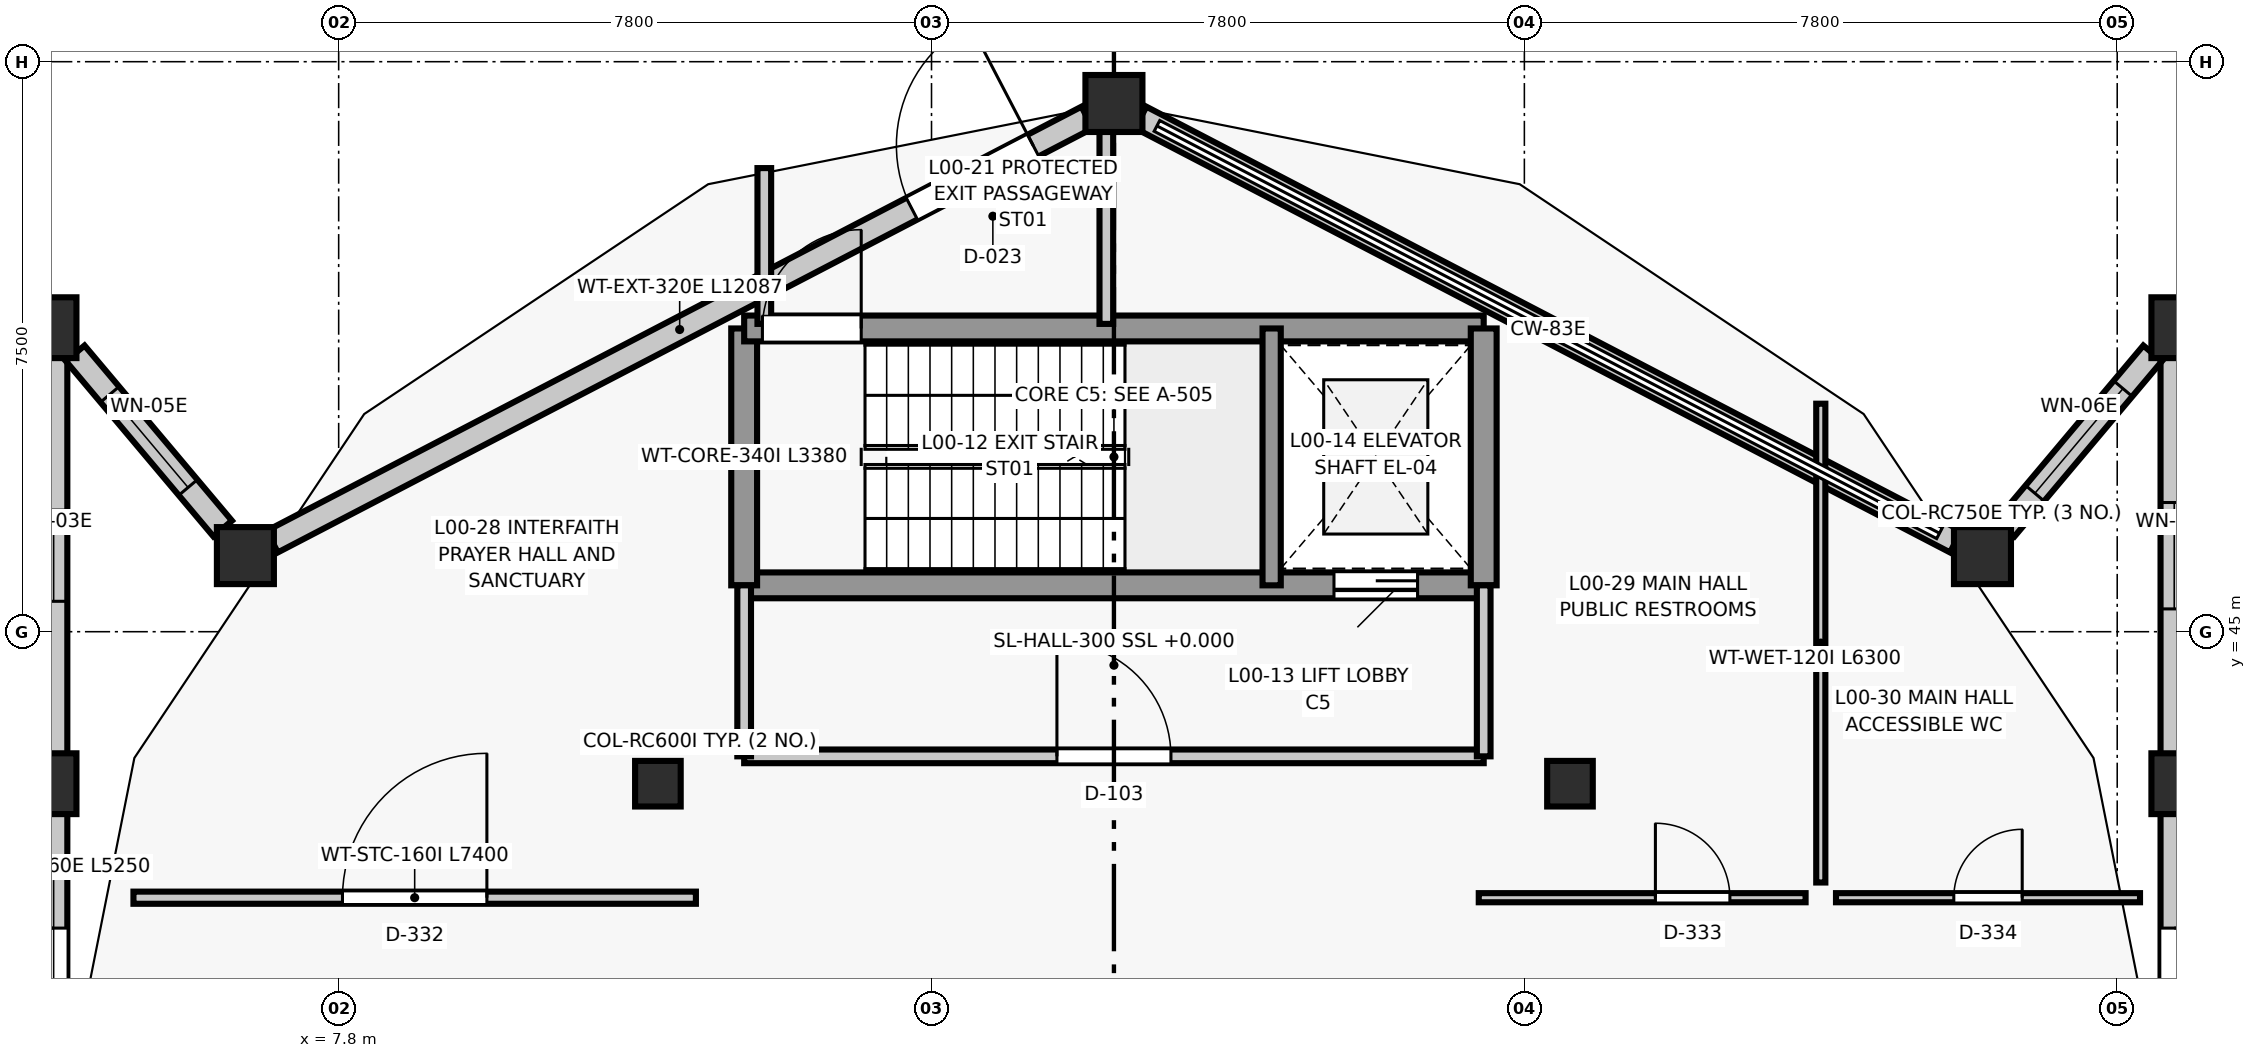
"""IFC4 building model, lengths in metres.
Left out: names, types, materials, properties, quantities, classifications, styles, units other than length and angle.
Written with IfcOpenShell. Run it as: python <this file> out.ifc"""

import sys

from ifc_helpers import new_model, si_unit, direction, frame, frame_2d, origin, origin_2d, place, context, subcontext, project, spatial, rectangle, extrude, element, fill, save


model = new_model("IFC4")
c1 = context("Model", 3, precision=1e-05, world=origin(), true_north=direction((0.0, 1.0)))
c2 = subcontext(c1, "Body", "Model", "MODEL_VIEW")
j1 = project(units=[si_unit("LENGTHUNIT", "METRE"), si_unit("PLANEANGLEUNIT", "RADIAN")], contexts=[c1])
p1 = place(None, origin())
s1 = spatial("IfcSite", under=j1, at=p1, CompositionType="ELEMENT")
p2 = place(p1, origin())
s2 = spatial("IfcBuilding", under=s1, at=p2, CompositionType="ELEMENT")
p3 = place(p2, origin())
s3 = spatial("IfcBuildingStorey", under=s2, at=p3, CompositionType="ELEMENT", Elevation=0.0)
for number, where, z_axis, x_axis in (
    (1, (29.427, 46.001, 0.0), (0.0, 0.0, 1.0), (1.0, 0.0, 0.0)),
    (2, (18.0, 51.95, 0.0), (0.0, 0.0, 1.0), (1.0, 0.0, 0.0)),
    (3, (6.573, 46.001, 0.0), (0.0, 0.0, 1.0), (1.0, 0.0, 0.0)),
):
    element("IfcColumn", number, at=place(p3, frame(where, z_axis=z_axis, x_axis=x_axis)), inside=s3, PredefinedType="COLUMN", context=c2, shape_type="SweptSolid", body=[
        extrude(rectangle(XDim=0.75, YDim=0.75, at=origin_2d()), origin(), (0.0, 0.0, 1.0), 4.5),
    ])
for number, where, z_axis, x_axis in (
    (4, (12.0, 43.0, 0.0), (0.0, 0.0, 1.0), (1.0, 0.0, 0.0)),
    (5, (24.0, 43.0, 0.0), (0.0, 0.0, 1.0), (1.0, 0.0, 0.0)),
):
    element("IfcColumn", number, at=place(p3, frame(where, z_axis=z_axis, x_axis=x_axis)), inside=s3, PredefinedType="COLUMN", context=c2, shape_type="SweptSolid", body=[
        extrude(rectangle(XDim=0.6, YDim=0.6, at=origin_2d()), origin(), (0.0, 0.0, 1.0), 4.5),
    ])
for number, where, z_axis, x_axis in (
    (6, (31.95, 43.0, 0.0), (0.0, 0.0, 1.0), (1.0, 0.0, 0.0)),
    (7, (31.95, 49.0, 0.0), (0.0, 0.0, 1.0), (1.0, 0.0, 0.0)),
    (8, (4.05, 43.0, 0.0), (0.0, 0.0, 1.0), (1.0, 0.0, 0.0)),
    (9, (4.05, 49.0, 0.0), (0.0, 0.0, 1.0), (1.0, 0.0, 0.0)),
):
    element("IfcColumn", number, at=place(p3, frame(where, z_axis=z_axis, x_axis=x_axis)), inside=s3, PredefinedType="COLUMN", context=c2, shape_type="SweptSolid", body=[
        extrude(rectangle(XDim=0.6, YDim=0.8, at=origin_2d()), origin(), (0.0, 0.0, 1.0), 4.5),
    ])
p4 = place(p3, frame((4.05, 37.375, 0.0), z_axis=(0.0, 0.0, 1.0), x_axis=(0.0, 1.0, 0.0)))
e10 = element("IfcWall", 10, at=p4, inside=s3, PredefinedType="STANDARD", context=c2, shape_type="SweptSolid", body=[
    extrude(rectangle(XDim=5.25, YDim=0.36, at=frame_2d((2.625, 0.0))), origin(), (0.0, 0.0, 1.0), 3.345),
])
p5 = place(p4, frame((1.525, 0.0, 0.0)))
e11 = element("IfcOpeningElement", 11, at=p5, cuts=e10, PredefinedType="OPENING", context=c2, shape_type="SweptSolid", body=[
    extrude(rectangle(XDim=2.2, YDim=2.35, at=frame_2d((1.1, 1.175))), frame((0.0, 0.19, 0.0), z_axis=(0.0, -1.0, 0.0), x_axis=(1.0, 0.0, 0.0)), (0.0, 0.0, 1.0), 0.38),
])
p6 = place(p3, frame((31.95, 42.625, 0.0), z_axis=(0.0, 0.0, 1.0), x_axis=(0.0, -1.0, 0.0)))
e12 = element("IfcWall", 12, at=p6, inside=s3, PredefinedType="STANDARD", context=c2, shape_type="SweptSolid", body=[
    extrude(rectangle(XDim=5.25, YDim=0.36, at=frame_2d((2.625, 0.0))), origin(), (0.0, 0.0, 1.0), 3.345),
])
p7 = place(p6, frame((1.525, 0.0, 0.0)))
e13 = element("IfcOpeningElement", 13, at=p7, cuts=e12, PredefinedType="OPENING", context=c2, shape_type="SweptSolid", body=[
    extrude(rectangle(XDim=2.2, YDim=2.35, at=frame_2d((1.1, 1.175))), frame((0.0, 0.19, 0.0), z_axis=(0.0, -1.0, 0.0), x_axis=(1.0, 0.0, 0.0)), (0.0, 0.0, 1.0), 0.38),
])
p8 = place(p3, frame((4.05, 43.375, 0.0), z_axis=(0.0, 0.0, 1.0), x_axis=(0.0, 1.0, 0.0)))
e14 = element("IfcWall", 14, at=p8, inside=s3, PredefinedType="STANDARD", context=c2, shape_type="SweptSolid", body=[
    extrude(rectangle(XDim=5.25, YDim=0.36, at=frame_2d((2.625, 0.0))), origin(), (0.0, 0.0, 1.0), 3.345),
])
p9 = place(p8, frame((2.025, 0.0, 0.9)))
e15 = element("IfcOpeningElement", 15, at=p9, cuts=e14, PredefinedType="OPENING", context=c2, shape_type="SweptSolid", body=[
    extrude(rectangle(XDim=1.2, YDim=1.2, at=frame_2d((0.6, 0.6))), frame((0.0, 0.19, 0.0), z_axis=(0.0, -1.0, 0.0), x_axis=(1.0, 0.0, 0.0)), (0.0, 0.0, 1.0), 0.38),
])
p10 = place(p3, frame((31.95, 48.625, 0.0), z_axis=(0.0, 0.0, 1.0), x_axis=(0.0, -1.0, 0.0)))
e16 = element("IfcWall", 16, at=p10, inside=s3, PredefinedType="STANDARD", context=c2, shape_type="SweptSolid", body=[
    extrude(rectangle(XDim=5.25, YDim=0.36, at=frame_2d((2.625, 0.0))), origin(), (0.0, 0.0, 1.0), 3.345),
])
p11 = place(p10, frame((1.925, 0.0, 0.9)))
e17 = element("IfcOpeningElement", 17, at=p11, cuts=e16, PredefinedType="OPENING", context=c2, shape_type="SweptSolid", body=[
    extrude(rectangle(XDim=1.4, YDim=1.4, at=frame_2d((0.7, 0.7))), frame((0.0, 0.19, 0.0), z_axis=(0.0, -1.0, 0.0), x_axis=(1.0, 0.0, 0.0)), (0.0, 0.0, 1.0), 0.38),
])
p12 = place(p3, frame((4.334, 48.663, 0.0), z_axis=(0.0, 0.0, 1.0), x_axis=(0.643796278673, -0.765196936459, 0.0)))
e18 = element("IfcWall", 18, at=p12, inside=s3, PredefinedType="STANDARD", context=c2, shape_type="SweptSolid", body=[
    extrude(rectangle(XDim=3.012, YDim=0.32, at=frame_2d((1.506, 0.0))), origin(), (0.0, 0.0, 1.0), 3.71),
])
p13 = place(p12, frame((0.706, 0.0, 0.85)))
e19 = element("IfcOpeningElement", 19, at=p13, cuts=e18, PredefinedType="OPENING", context=c2, shape_type="SweptSolid", body=[
    extrude(rectangle(XDim=1.6, YDim=1.4, at=frame_2d((0.8, 0.7))), frame((0.0, 0.17, 0.0), z_axis=(0.0, -1.0, 0.0), x_axis=(1.0, 0.0, 0.0)), (0.0, 0.0, 1.0), 0.34),
])
p14 = place(p3, frame((6.926, 46.185, 0.0), z_axis=(0.0, 0.0, 1.0), x_axis=(0.887012674584, 0.46174507591, 0.0)))
e20 = element("IfcWall", 20, at=p14, inside=s3, PredefinedType="STANDARD", context=c2, shape_type="SweptSolid", body=[
    extrude(rectangle(XDim=12.087, YDim=0.32, at=frame_2d((6.044, 0.0))), origin(), (0.0, 0.0, 1.0), 3.71),
])
p15 = place(p14, frame((9.487, 0.0, 0.0)))
e21 = element("IfcOpeningElement", 21, at=p15, cuts=e20, PredefinedType="OPENING", context=c2, shape_type="SweptSolid", body=[
    extrude(rectangle(XDim=1.8, YDim=2.25, at=frame_2d((0.9, 1.125))), frame((0.0, 0.17, 0.0), z_axis=(0.0, -1.0, 0.0), x_axis=(1.0, 0.0, 0.0)), (0.0, 0.0, 1.0), 0.34),
])
p16 = place(p3, frame((18.353, 51.766, 0.0), z_axis=(0.0, 0.0, 1.0), x_axis=(0.887012674584, -0.46174507591, 0.0)))
e22 = element("IfcWall", 22, at=p16, inside=s3, PredefinedType="STANDARD", context=c2, shape_type="SweptSolid", body=[
    extrude(rectangle(XDim=12.087, YDim=0.32, at=frame_2d((6.044, 0.0))), origin(), (0.0, 0.0, 1.0), 0.8),
])
p17 = place(p3, frame((29.727, 46.357, 0.0), z_axis=(0.0, 0.0, 1.0), x_axis=(0.643796278673, 0.765196936459, 0.0)))
e23 = element("IfcWall", 23, at=p17, inside=s3, PredefinedType="STANDARD", context=c2, shape_type="SweptSolid", body=[
    extrude(rectangle(XDim=3.012, YDim=0.32, at=frame_2d((1.506, 0.0))), origin(), (0.0, 0.0, 1.0), 3.71),
])
p18 = place(p17, frame((0.606, 0.0, 0.85)))
e24 = element("IfcOpeningElement", 24, at=p18, cuts=e23, PredefinedType="OPENING", context=c2, shape_type="SweptSolid", body=[
    extrude(rectangle(XDim=1.8, YDim=1.4, at=frame_2d((0.9, 0.7))), frame((0.0, 0.17, 0.0), z_axis=(0.0, -1.0, 0.0), x_axis=(1.0, 0.0, 0.0)), (0.0, 0.0, 1.0), 0.34),
])
p19 = place(p3, frame((22.865, 45.61, 0.0), z_axis=(0.0, 0.0, 1.0), x_axis=(-1.0, 0.0, 0.0)))
e25 = element("IfcWall", 25, at=p19, inside=s3, PredefinedType="SHEAR", context=c2, shape_type="SweptSolid", body=[
    extrude(rectangle(XDim=9.73, YDim=0.34, at=frame_2d((4.865, 0.0))), origin(), (0.0, 0.0, 1.0), 4.5),
])
p20 = place(p19, frame((0.87, 0.0, 0.0)))
e26 = element("IfcOpeningElement", 26, at=p20, cuts=e25, PredefinedType="OPENING", context=c2, shape_type="SweptSolid", body=[
    extrude(rectangle(XDim=1.1, YDim=2.15, at=frame_2d((0.55, 1.075))), frame((0.0, 0.18, 0.0), z_axis=(0.0, -1.0, 0.0), x_axis=(1.0, 0.0, 0.0)), (0.0, 0.0, 1.0), 0.36),
])
p21 = place(p3, frame((13.135, 45.61, 0.0), z_axis=(0.0, 0.0, 1.0), x_axis=(0.0, 1.0, 0.0)))
e27 = element("IfcWall", 27, at=p21, inside=s3, PredefinedType="SHEAR", context=c2, shape_type="SweptSolid", body=[
    extrude(rectangle(XDim=3.38, YDim=0.34, at=frame_2d((1.69, 0.0))), origin(), (0.0, 0.0, 1.0), 4.5),
])
p22 = place(p3, frame((13.135, 48.99, 0.0), z_axis=(0.0, 0.0, 1.0), x_axis=(1.0, 0.0, 0.0)))
e28 = element("IfcWall", 28, at=p22, inside=s3, PredefinedType="SHEAR", context=c2, shape_type="SweptSolid", body=[
    extrude(rectangle(XDim=9.73, YDim=0.34, at=frame_2d((4.865, 0.0))), origin(), (0.0, 0.0, 1.0), 4.5),
])
p23 = place(p22, frame((0.24, 0.0, 0.0)))
e29 = element("IfcOpeningElement", 29, at=p23, cuts=e28, PredefinedType="OPENING", context=c2, shape_type="SweptSolid", body=[
    extrude(rectangle(XDim=1.3, YDim=2.15, at=frame_2d((0.65, 1.075))), frame((0.0, 0.18, 0.0), z_axis=(0.0, -1.0, 0.0), x_axis=(1.0, 0.0, 0.0)), (0.0, 0.0, 1.0), 0.36),
])
p24 = place(p3, frame((22.865, 48.99, 0.0), z_axis=(0.0, 0.0, 1.0), x_axis=(0.0, -1.0, 0.0)))
e30 = element("IfcWall", 30, at=p24, inside=s3, PredefinedType="SHEAR", context=c2, shape_type="SweptSolid", body=[
    extrude(rectangle(XDim=3.38, YDim=0.34, at=frame_2d((1.69, 0.0))), origin(), (0.0, 0.0, 1.0), 4.5),
])
p25 = place(p3, frame((20.075, 45.61, 0.0), z_axis=(0.0, 0.0, 1.0), x_axis=(0.0, 1.0, 0.0)))
e31 = element("IfcWall", 31, at=p25, inside=s3, PredefinedType="SHEAR", context=c2, shape_type="SweptSolid", body=[
    extrude(rectangle(XDim=3.38, YDim=0.24, at=frame_2d((1.69, 0.0))), origin(), (0.0, 0.0, 1.0), 4.5),
])
p26 = place(p3, frame((13.135, 43.36, 0.0), z_axis=(0.0, 0.0, 1.0), x_axis=(1.0, 0.0, 0.0)))
e32 = element("IfcWall", 32, at=p26, inside=s3, PredefinedType="PARTITIONING", context=c2, shape_type="SweptSolid", body=[
    extrude(rectangle(XDim=9.73, YDim=0.18, at=frame_2d((4.865, 0.0))), origin(), (0.0, 0.0, 1.0), 4.255),
])
p27 = place(p26, frame((4.115, 0.0, 0.0)))
e33 = element("IfcOpeningElement", 33, at=p27, cuts=e32, PredefinedType="OPENING", context=c2, shape_type="SweptSolid", body=[
    extrude(rectangle(XDim=1.5, YDim=2.15, at=frame_2d((0.75, 1.075))), frame((0.0, 0.1, 0.0), z_axis=(0.0, -1.0, 0.0), x_axis=(1.0, 0.0, 0.0)), (0.0, 0.0, 1.0), 0.2),
])
for number, where, z_axis, x_axis in (
    (34, (13.135, 45.61, 0.0), (0.0, 0.0, 1.0), (0.0, -1.0, 0.0)),
    (35, (22.865, 45.61, 0.0), (0.0, 0.0, 1.0), (0.0, -1.0, 0.0)),
):
    element("IfcWall", number, at=place(p3, frame(where, z_axis=z_axis, x_axis=x_axis)), inside=s3, PredefinedType="PARTITIONING", context=c2, shape_type="SweptSolid", body=[
        extrude(rectangle(XDim=2.25, YDim=0.18, at=frame_2d((1.125, 0.0))), origin(), (0.0, 0.0, 1.0), 4.255),
    ])
p28 = place(p3, frame((13.4, 49.05, 0.0), z_axis=(0.0, 0.0, 1.0), x_axis=(0.0, 1.0, 0.0)))
e36 = element("IfcWall", 36, at=p28, inside=s3, PredefinedType="PARTITIONING", context=c2, shape_type="SweptSolid", body=[
    extrude(rectangle(XDim=2.05, YDim=0.18, at=frame_2d((1.025, 0.0))), origin(), (0.0, 0.0, 1.0), 4.255),
])
p29 = place(p3, frame((17.9, 49.05, 0.0), z_axis=(0.0, 0.0, 1.0), x_axis=(0.0, 1.0, 0.0)))
e37 = element("IfcWall", 37, at=p29, inside=s3, PredefinedType="PARTITIONING", context=c2, shape_type="SweptSolid", body=[
    extrude(rectangle(XDim=2.6, YDim=0.18, at=frame_2d((1.3, 0.0))), origin(), (0.0, 0.0, 1.0), 4.255),
])
p30 = place(p3, frame((5.1, 41.5, 0.0), z_axis=(0.0, 0.0, 1.0), x_axis=(1.0, 0.0, 0.0)))
e38 = element("IfcWall", 38, at=p30, inside=s3, PredefinedType="PARTITIONING", context=c2, shape_type="SweptSolid", body=[
    extrude(rectangle(XDim=7.4, YDim=0.16, at=frame_2d((3.7, 0.0))), origin(), (0.0, 0.0, 1.0), 4.255),
])
p31 = place(p30, frame((2.75, 0.0, 0.0)))
e39 = element("IfcOpeningElement", 39, at=p31, cuts=e38, PredefinedType="OPENING", context=c2, shape_type="SweptSolid", body=[
    extrude(rectangle(XDim=1.9, YDim=2.25, at=frame_2d((0.95, 1.125))), frame((0.0, 0.09, 0.0), z_axis=(0.0, -1.0, 0.0), x_axis=(1.0, 0.0, 0.0)), (0.0, 0.0, 1.0), 0.18),
])
p32 = place(p3, frame((22.8, 41.5, 0.0), z_axis=(0.0, 0.0, 1.0), x_axis=(1.0, 0.0, 0.0)))
e40 = element("IfcWall", 40, at=p32, inside=s3, PredefinedType="PARTITIONING", context=c2, shape_type="SweptSolid", body=[
    extrude(rectangle(XDim=4.3, YDim=0.12, at=frame_2d((2.15, 0.0))), origin(), (0.0, 0.0, 1.0), 4.255),
])
p33 = place(p32, frame((2.324, 0.0, 0.0)))
e41 = element("IfcOpeningElement", 41, at=p33, cuts=e40, PredefinedType="OPENING", context=c2, shape_type="SweptSolid", body=[
    extrude(rectangle(XDim=0.98, YDim=2.1, at=frame_2d((0.49, 1.05))), frame((0.0, 0.07, 0.0), z_axis=(0.0, -1.0, 0.0), x_axis=(1.0, 0.0, 0.0)), (0.0, 0.0, 1.0), 0.14),
])
p34 = place(p3, frame((27.5, 41.5, 0.0), z_axis=(0.0, 0.0, 1.0), x_axis=(1.0, 0.0, 0.0)))
e42 = element("IfcWall", 42, at=p34, inside=s3, PredefinedType="PARTITIONING", context=c2, shape_type="SweptSolid", body=[
    extrude(rectangle(XDim=4.0, YDim=0.12, at=frame_2d((2.0, 0.0))), origin(), (0.0, 0.0, 1.0), 4.255),
])
p35 = place(p34, frame((1.55, 0.0, 0.0)))
e43 = element("IfcOpeningElement", 43, at=p35, cuts=e42, PredefinedType="OPENING", context=c2, shape_type="SweptSolid", body=[
    extrude(rectangle(XDim=0.9, YDim=2.1, at=frame_2d((0.45, 1.05))), frame((0.0, 0.07, 0.0), z_axis=(0.0, -1.0, 0.0), x_axis=(1.0, 0.0, 0.0)), (0.0, 0.0, 1.0), 0.14),
])
p36 = place(p3, frame((27.3, 41.7, 0.0), z_axis=(0.0, 0.0, 1.0), x_axis=(0.0, 1.0, 0.0)))
e44 = element("IfcWall", 44, at=p36, inside=s3, PredefinedType="PARTITIONING", context=c2, shape_type="SweptSolid", body=[
    extrude(rectangle(XDim=6.3, YDim=0.12, at=frame_2d((3.15, 0.0))), origin(), (0.0, 0.0, 1.0), 4.255),
])
p37 = place(p5, origin())
e45 = element("IfcDoor", 45, at=p37, inside=s3, OperationType="SINGLE_SWING_RIGHT", PredefinedType="DOOR", context=c2, shape_type="SweptSolid", body=[
    extrude(rectangle(XDim=2.2, YDim=2.35, at=frame_2d((1.1, 1.175))), frame((0.0, 0.025, 0.0), z_axis=(0.0, -1.0, 0.0), x_axis=(1.0, 0.0, 0.0)), (0.0, 0.0, 1.0), 0.05),
])
fill(e11, e45)
p38 = place(p7, origin())
e46 = element("IfcDoor", 46, at=p38, inside=s3, OperationType="SINGLE_SWING_LEFT", PredefinedType="DOOR", context=c2, shape_type="SweptSolid", body=[
    extrude(rectangle(XDim=2.2, YDim=2.35, at=frame_2d((1.1, 1.175))), frame((0.0, 0.025, 0.0), z_axis=(0.0, -1.0, 0.0), x_axis=(1.0, 0.0, 0.0)), (0.0, 0.0, 1.0), 0.05),
])
fill(e13, e46)
p39 = place(p9, origin())
e47 = element("IfcWindow", 47, at=p39, inside=s3, PartitioningType="SINGLE_PANEL", PredefinedType="WINDOW", context=c2, shape_type="SweptSolid", body=[
    extrude(rectangle(XDim=1.2, YDim=1.2, at=frame_2d((0.6, 0.6))), frame((0.0, 0.03, 0.0), z_axis=(0.0, -1.0, 0.0), x_axis=(1.0, 0.0, 0.0)), (0.0, 0.0, 1.0), 0.06),
])
fill(e15, e47)
p40 = place(p11, origin())
e48 = element("IfcWindow", 48, at=p40, inside=s3, PartitioningType="SINGLE_PANEL", PredefinedType="WINDOW", context=c2, shape_type="SweptSolid", body=[
    extrude(rectangle(XDim=1.4, YDim=1.4, at=frame_2d((0.7, 0.7))), frame((0.0, 0.03, 0.0), z_axis=(0.0, -1.0, 0.0), x_axis=(1.0, 0.0, 0.0)), (0.0, 0.0, 1.0), 0.06),
])
fill(e17, e48)
p41 = place(p13, origin())
e49 = element("IfcWindow", 49, at=p41, inside=s3, PartitioningType="SINGLE_PANEL", PredefinedType="WINDOW", context=c2, shape_type="SweptSolid", body=[
    extrude(rectangle(XDim=1.6, YDim=1.4, at=frame_2d((0.8, 0.7))), frame((0.0, 0.03, 0.0), z_axis=(0.0, -1.0, 0.0), x_axis=(1.0, 0.0, 0.0)), (0.0, 0.0, 1.0), 0.06),
])
fill(e19, e49)
p42 = place(p15, origin())
e50 = element("IfcDoor", 50, at=p42, inside=s3, OperationType="SINGLE_SWING_RIGHT", PredefinedType="DOOR", context=c2, shape_type="SweptSolid", body=[
    extrude(rectangle(XDim=1.8, YDim=2.25, at=frame_2d((0.9, 1.125))), frame((0.0, 0.025, 0.0), z_axis=(0.0, -1.0, 0.0), x_axis=(1.0, 0.0, 0.0)), (0.0, 0.0, 1.0), 0.05),
])
fill(e21, e50)
p43 = place(p18, origin())
e51 = element("IfcWindow", 51, at=p43, inside=s3, PartitioningType="SINGLE_PANEL", PredefinedType="WINDOW", context=c2, shape_type="SweptSolid", body=[
    extrude(rectangle(XDim=1.8, YDim=1.4, at=frame_2d((0.9, 0.7))), frame((0.0, 0.03, 0.0), z_axis=(0.0, -1.0, 0.0), x_axis=(1.0, 0.0, 0.0)), (0.0, 0.0, 1.0), 0.06),
])
fill(e24, e51)
p44 = place(p23, origin())
e52 = element("IfcDoor", 52, at=p44, inside=s3, OperationType="SINGLE_SWING_RIGHT", PredefinedType="DOOR", context=c2, shape_type="SweptSolid", body=[
    extrude(rectangle(XDim=1.3, YDim=2.15, at=frame_2d((0.65, 1.075))), frame((0.0, 0.025, 0.0), z_axis=(0.0, -1.0, 0.0), x_axis=(1.0, 0.0, 0.0)), (0.0, 0.0, 1.0), 0.05),
])
fill(e29, e52)
p45 = place(p20, origin())
e53 = element("IfcDoor", 53, at=p45, inside=s3, OperationType="SLIDING_TO_LEFT", PredefinedType="DOOR", context=c2, shape_type="SweptSolid", body=[
    extrude(rectangle(XDim=1.1, YDim=2.15, at=frame_2d((0.55, 1.075))), frame((0.0, 0.025, 0.0), z_axis=(0.0, -1.0, 0.0), x_axis=(1.0, 0.0, 0.0)), (0.0, 0.0, 1.0), 0.05),
])
fill(e26, e53)
p46 = place(p27, origin())
e54 = element("IfcDoor", 54, at=p46, inside=s3, OperationType="SINGLE_SWING_LEFT", PredefinedType="DOOR", context=c2, shape_type="SweptSolid", body=[
    extrude(rectangle(XDim=1.5, YDim=2.15, at=frame_2d((0.75, 1.075))), frame((0.0, 0.025, 0.0), z_axis=(0.0, -1.0, 0.0), x_axis=(1.0, 0.0, 0.0)), (0.0, 0.0, 1.0), 0.05),
])
fill(e33, e54)
p47 = place(p31, origin())
e55 = element("IfcDoor", 55, at=p47, inside=s3, OperationType="SINGLE_SWING_RIGHT", PredefinedType="DOOR", context=c2, shape_type="SweptSolid", body=[
    extrude(rectangle(XDim=1.9, YDim=2.25, at=frame_2d((0.95, 1.125))), frame((0.0, 0.025, 0.0), z_axis=(0.0, -1.0, 0.0), x_axis=(1.0, 0.0, 0.0)), (0.0, 0.0, 1.0), 0.05),
])
fill(e39, e55)
p48 = place(p33, origin())
e56 = element("IfcDoor", 56, at=p48, inside=s3, OperationType="SINGLE_SWING_LEFT", PredefinedType="DOOR", context=c2, shape_type="SweptSolid", body=[
    extrude(rectangle(XDim=0.98, YDim=2.1, at=frame_2d((0.49, 1.05))), frame((0.0, 0.025, 0.0), z_axis=(0.0, -1.0, 0.0), x_axis=(1.0, 0.0, 0.0)), (0.0, 0.0, 1.0), 0.05),
])
fill(e41, e56)
p49 = place(p35, origin())
e57 = element("IfcDoor", 57, at=p49, inside=s3, OperationType="SINGLE_SWING_RIGHT", PredefinedType="DOOR", context=c2, shape_type="SweptSolid", body=[
    extrude(rectangle(XDim=0.9, YDim=2.1, at=frame_2d((0.45, 1.05))), frame((0.0, 0.025, 0.0), z_axis=(0.0, -1.0, 0.0), x_axis=(1.0, 0.0, 0.0)), (0.0, 0.0, 1.0), 0.05),
])
fill(e43, e57)
save(model, sys.argv[1])
